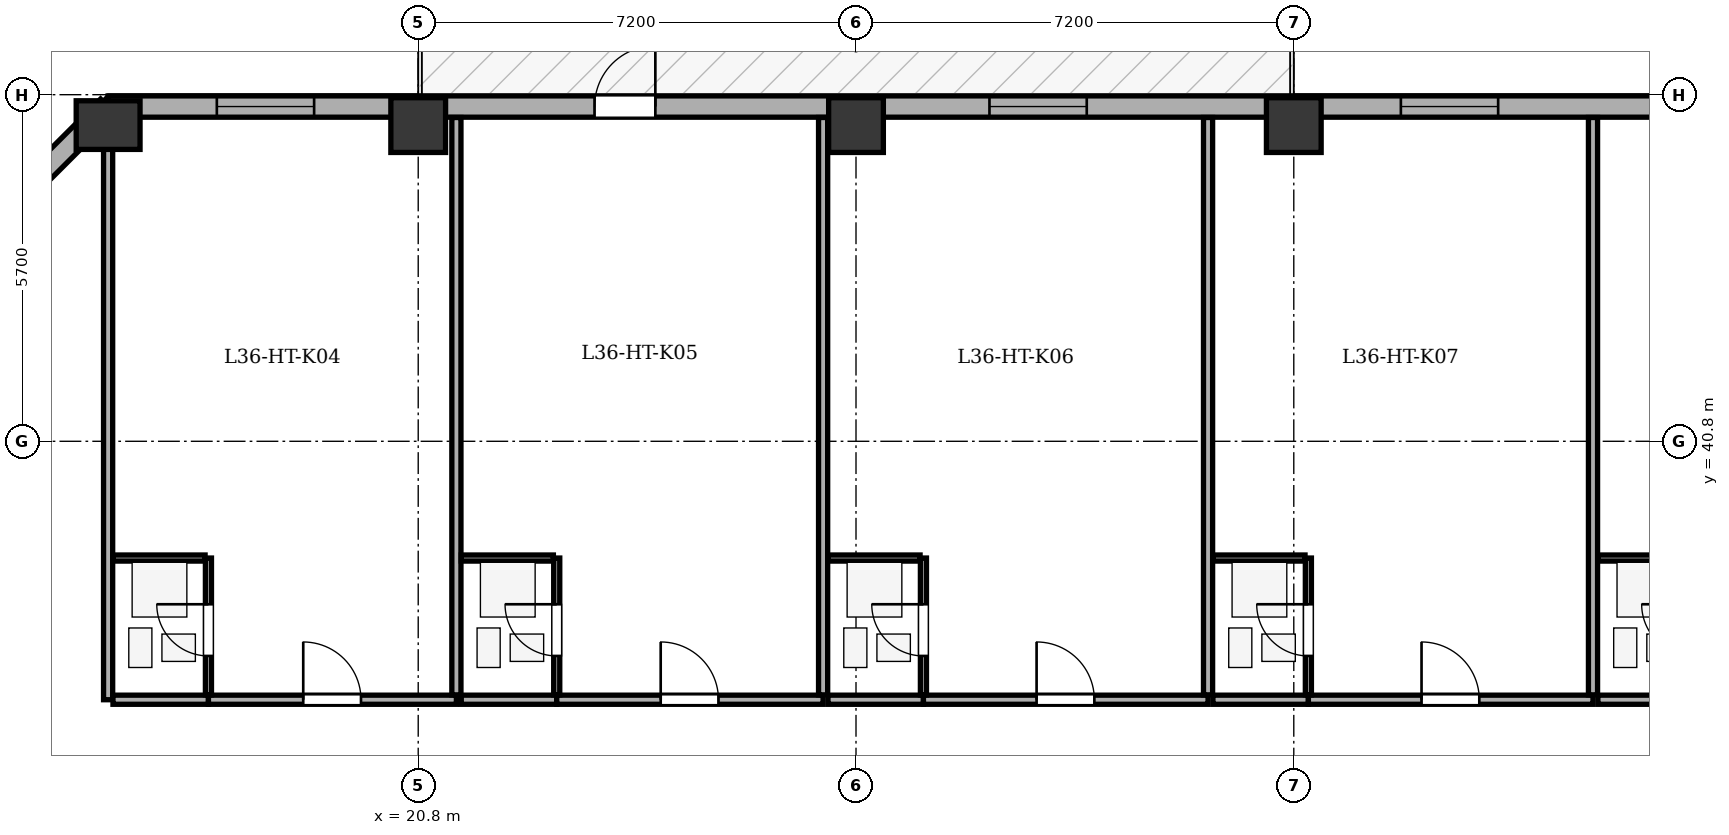
"""IFC4 building model, lengths in metres.
Left out: names, types, materials, properties, quantities, classifications, styles, units other than length and angle.
Written with IfcOpenShell. Run it as: python <this file> out.ifc"""

import sys

from ifc_helpers import new_model, si_unit, direction, frame, frame_2d, origin, origin_2d, place, context, subcontext, project, spatial, rectangle, extrude, element, fill, save


model = new_model("IFC4")
c1 = context("Model", 3, precision=1e-05, world=origin(), true_north=direction((0.0, 1.0)))
c2 = subcontext(c1, "Body", "Model", "MODEL_VIEW")
j1 = project(units=[si_unit("LENGTHUNIT", "METRE"), si_unit("PLANEANGLEUNIT", "RADIAN")], contexts=[c1])
p1 = place(None, origin())
s1 = spatial("IfcSite", under=j1, at=p1, CompositionType="ELEMENT")
p2 = place(p1, origin())
s2 = spatial("IfcBuilding", under=s1, at=p2, CompositionType="ELEMENT")
p3 = place(p2, frame((0.0, 0.0, 144.8)))
s3 = spatial("IfcBuildingStorey", under=s2, at=p3, CompositionType="ELEMENT", Elevation=144.8)
p4 = place(p3, frame((15.7, 46.0, 0.0), z_axis=(0.0, 0.0, 1.0), x_axis=(1.0, 0.0, 0.0)))
e1 = element("IfcColumn", 1, at=p4, inside=s3, PredefinedType="COLUMN", context=c2, shape_type="SweptSolid", body=[
    extrude(rectangle(XDim=0.8, YDim=1.05, at=origin_2d()), origin(), (0.0, 0.0, 1.0), 3.5),
])
for number, where, z_axis, x_axis in (
    (2, (20.8, 46.0, 0.0), (0.0, 0.0, 1.0), (1.0, 0.0, 0.0)),
    (3, (28.0, 46.0, 0.0), (0.0, 0.0, 1.0), (1.0, 0.0, 0.0)),
    (4, (35.2, 46.0, 0.0), (0.0, 0.0, 1.0), (1.0, 0.0, 0.0)),
):
    element("IfcColumn", number, at=place(p3, frame(where, z_axis=z_axis, x_axis=x_axis)), inside=s3, PredefinedType="COLUMN", context=c2, shape_type="SweptSolid", body=[
        extrude(rectangle(XDim=0.9, YDim=0.9, at=origin_2d()), origin(), (0.0, 0.0, 1.0), 3.5),
    ])
p5 = place(p3, frame((10.895, 41.5, 0.0), z_axis=(0.0, 0.0, 1.0), x_axis=(0.707106781187, 0.707106781187, 0.0)))
e5 = element("IfcWall", 5, at=p5, inside=s3, PredefinedType="STANDARD", context=c2, shape_type="SweptSolid", body=[
    extrude(rectangle(XDim=6.795, YDim=0.35, at=frame_2d((3.397, 0.0))), origin(), (0.0, 0.0, 1.0), 2.785),
])
p6 = place(p5, frame((2.698, 0.0, 0.75)))
e6 = element("IfcOpeningElement", 6, at=p6, cuts=e5, PredefinedType="OPENING", context=c2, shape_type="SweptSolid", body=[
    extrude(rectangle(XDim=1.4, YDim=1.65, at=frame_2d((0.7, 0.825))), frame((0.0, 0.185, 0.0), z_axis=(0.0, -1.0, 0.0), x_axis=(1.0, 0.0, 0.0)), (0.0, 0.0, 1.0), 0.37),
])
p7 = place(p3, frame((15.7, 46.305, 0.0), z_axis=(0.0, 0.0, 1.0), x_axis=(1.0, 0.0, 0.0)))
e7 = element("IfcWall", 7, at=p7, inside=s3, PredefinedType="STANDARD", context=c2, shape_type="SweptSolid", body=[
    extrude(rectangle(XDim=35.0, YDim=0.35, at=frame_2d((17.5, 0.0))), origin(), (0.0, 0.0, 1.0), 2.785),
])
p8 = place(p7, frame((8.0, 0.0, 0.0)))
e8 = element("IfcOpeningElement", 8, at=p8, cuts=e7, PredefinedType="OPENING", context=c2, shape_type="SweptSolid", body=[
    extrude(rectangle(XDim=1.0, YDim=2.02, at=frame_2d((0.5, 1.01))), frame((0.0, 0.185, 0.0), z_axis=(0.0, -1.0, 0.0), x_axis=(1.0, 0.0, 0.0)), (0.0, 0.0, 1.0), 0.37),
])
p9 = place(p7, frame((1.788, 0.0, 0.75)))
e9 = element("IfcOpeningElement", 9, at=p9, cuts=e7, PredefinedType="OPENING", context=c2, shape_type="SweptSolid", body=[
    extrude(rectangle(XDim=1.6, YDim=1.75, at=frame_2d((0.8, 0.875))), frame((0.0, 0.185, 0.0), z_axis=(0.0, -1.0, 0.0), x_axis=(1.0, 0.0, 0.0)), (0.0, 0.0, 1.0), 0.37),
])
p10 = place(p7, frame((14.495, 0.0, 0.75)))
e10 = element("IfcOpeningElement", 10, at=p10, cuts=e7, PredefinedType="OPENING", context=c2, shape_type="SweptSolid", body=[
    extrude(rectangle(XDim=1.6, YDim=1.75, at=frame_2d((0.8, 0.875))), frame((0.0, 0.185, 0.0), z_axis=(0.0, -1.0, 0.0), x_axis=(1.0, 0.0, 0.0)), (0.0, 0.0, 1.0), 0.37),
])
p11 = place(p7, frame((21.261, 0.0, 0.75)))
e11 = element("IfcOpeningElement", 11, at=p11, cuts=e7, PredefinedType="OPENING", context=c2, shape_type="SweptSolid", body=[
    extrude(rectangle(XDim=1.6, YDim=1.75, at=frame_2d((0.8, 0.875))), frame((0.0, 0.185, 0.0), z_axis=(0.0, -1.0, 0.0), x_axis=(1.0, 0.0, 0.0)), (0.0, 0.0, 1.0), 0.37),
])
p12 = place(p7, frame((26.486, 0.0, 0.75)))
e12 = element("IfcOpeningElement", 12, at=p12, cuts=e7, PredefinedType="OPENING", context=c2, shape_type="SweptSolid", body=[
    extrude(rectangle(XDim=1.6, YDim=1.75, at=frame_2d((0.8, 0.875))), frame((0.0, 0.185, 0.0), z_axis=(0.0, -1.0, 0.0), x_axis=(1.0, 0.0, 0.0)), (0.0, 0.0, 1.0), 0.37),
])
p13 = place(p7, frame((31.637, 0.0, 0.75)))
e13 = element("IfcOpeningElement", 13, at=p13, cuts=e7, PredefinedType="OPENING", context=c2, shape_type="SweptSolid", body=[
    extrude(rectangle(XDim=1.6, YDim=1.75, at=frame_2d((0.8, 0.875))), frame((0.0, 0.185, 0.0), z_axis=(0.0, -1.0, 0.0), x_axis=(1.0, 0.0, 0.0)), (0.0, 0.0, 1.0), 0.37),
])
p14 = place(p3, frame((15.7, 36.55, 0.0), z_axis=(0.0, 0.0, 1.0), x_axis=(0.0, 1.0, 0.0)))
e14 = element("IfcWall", 14, at=p14, inside=s3, PredefinedType="PARTITIONING", context=c2, shape_type="SweptSolid", body=[
    extrude(rectangle(XDim=9.575, YDim=0.15, at=frame_2d((4.788, 0.0))), origin(), (0.0, 0.0, 1.0), 3.2),
])
p15 = place(p3, frame((15.78, 36.55, 0.0), z_axis=(0.0, 0.0, 1.0), x_axis=(1.0, 0.0, 0.0)))
e15 = element("IfcWall", 15, at=p15, inside=s3, PredefinedType="PARTITIONING", context=c2, shape_type="SweptSolid", body=[
    extrude(rectangle(XDim=1.57, YDim=0.15, at=frame_2d((0.785, 0.0))), origin(), (0.0, 0.0, 1.0), 3.2),
])
p16 = place(p3, frame((17.35, 36.55, 0.0), z_axis=(0.0, 0.0, 1.0), x_axis=(1.0, 0.0, 0.0)))
e16 = element("IfcWall", 16, at=p16, inside=s3, PredefinedType="PARTITIONING", context=c2, shape_type="SweptSolid", body=[
    extrude(rectangle(XDim=4.078, YDim=0.15, at=frame_2d((2.039, 0.0))), origin(), (0.0, 0.0, 1.0), 3.2),
])
p17 = place(p16, frame((1.559, 0.0, 0.0)))
e17 = element("IfcOpeningElement", 17, at=p17, cuts=e16, PredefinedType="OPENING", context=c2, shape_type="SweptSolid", body=[
    extrude(rectangle(XDim=0.95, YDim=2.1, at=frame_2d((0.475, 1.05))), frame((0.0, 0.085, 0.0), z_axis=(0.0, -1.0, 0.0), x_axis=(1.0, 0.0, 0.0)), (0.0, 0.0, 1.0), 0.17),
])
p18 = place(p3, frame((17.35, 36.63, 0.0), z_axis=(0.0, 0.0, 1.0), x_axis=(0.0, 1.0, 0.0)))
e18 = element("IfcWall", 18, at=p18, inside=s3, PredefinedType="PARTITIONING", context=c2, shape_type="SweptSolid", body=[
    extrude(rectangle(XDim=2.25, YDim=0.1, at=frame_2d((1.125, 0.0))), origin(), (0.0, 0.0, 1.0), 3.2),
])
p19 = place(p18, frame((0.64, 0.0, 0.0)))
e19 = element("IfcOpeningElement", 19, at=p19, cuts=e18, PredefinedType="OPENING", context=c2, shape_type="SweptSolid", body=[
    extrude(rectangle(XDim=0.85, YDim=2.05, at=frame_2d((0.425, 1.025))), frame((0.0, 0.06, 0.0), z_axis=(0.0, -1.0, 0.0), x_axis=(1.0, 0.0, 0.0)), (0.0, 0.0, 1.0), 0.12),
])
p20 = place(p3, frame((15.78, 38.88, 0.0), z_axis=(0.0, 0.0, 1.0), x_axis=(1.0, 0.0, 0.0)))
e20 = element("IfcWall", 20, at=p20, inside=s3, PredefinedType="PARTITIONING", context=c2, shape_type="SweptSolid", body=[
    extrude(rectangle(XDim=1.515, YDim=0.1, at=frame_2d((0.757, 0.0))), origin(), (0.0, 0.0, 1.0), 3.2),
])
p21 = place(p3, frame((21.428, 36.63, 0.0), z_axis=(0.0, 0.0, 1.0), x_axis=(0.0, 1.0, 0.0)))
e21 = element("IfcWall", 21, at=p21, inside=s3, PredefinedType="PARTITIONING", context=c2, shape_type="SweptSolid", body=[
    extrude(rectangle(XDim=9.495, YDim=0.15, at=frame_2d((4.748, 0.0))), origin(), (0.0, 0.0, 1.0), 3.2),
])
p22 = place(p3, frame((21.508, 36.55, 0.0), z_axis=(0.0, 0.0, 1.0), x_axis=(1.0, 0.0, 0.0)))
e22 = element("IfcWall", 22, at=p22, inside=s3, PredefinedType="PARTITIONING", context=c2, shape_type="SweptSolid", body=[
    extrude(rectangle(XDim=1.57, YDim=0.15, at=frame_2d((0.785, 0.0))), origin(), (0.0, 0.0, 1.0), 3.2),
])
p23 = place(p3, frame((23.078, 36.55, 0.0), z_axis=(0.0, 0.0, 1.0), x_axis=(1.0, 0.0, 0.0)))
e23 = element("IfcWall", 23, at=p23, inside=s3, PredefinedType="PARTITIONING", context=c2, shape_type="SweptSolid", body=[
    extrude(rectangle(XDim=4.381, YDim=0.15, at=frame_2d((2.19, 0.0))), origin(), (0.0, 0.0, 1.0), 3.2),
])
p24 = place(p23, frame((1.71, 0.0, 0.0)))
e24 = element("IfcOpeningElement", 24, at=p24, cuts=e23, PredefinedType="OPENING", context=c2, shape_type="SweptSolid", body=[
    extrude(rectangle(XDim=0.95, YDim=2.1, at=frame_2d((0.475, 1.05))), frame((0.0, 0.085, 0.0), z_axis=(0.0, -1.0, 0.0), x_axis=(1.0, 0.0, 0.0)), (0.0, 0.0, 1.0), 0.17),
])
p25 = place(p3, frame((23.078, 36.63, 0.0), z_axis=(0.0, 0.0, 1.0), x_axis=(0.0, 1.0, 0.0)))
e25 = element("IfcWall", 25, at=p25, inside=s3, PredefinedType="PARTITIONING", context=c2, shape_type="SweptSolid", body=[
    extrude(rectangle(XDim=2.25, YDim=0.1, at=frame_2d((1.125, 0.0))), origin(), (0.0, 0.0, 1.0), 3.2),
])
p26 = place(p25, frame((0.64, 0.0, 0.0)))
e26 = element("IfcOpeningElement", 26, at=p26, cuts=e25, PredefinedType="OPENING", context=c2, shape_type="SweptSolid", body=[
    extrude(rectangle(XDim=0.85, YDim=2.05, at=frame_2d((0.425, 1.025))), frame((0.0, 0.06, 0.0), z_axis=(0.0, -1.0, 0.0), x_axis=(1.0, 0.0, 0.0)), (0.0, 0.0, 1.0), 0.12),
])
p27 = place(p3, frame((21.508, 38.88, 0.0), z_axis=(0.0, 0.0, 1.0), x_axis=(1.0, 0.0, 0.0)))
e27 = element("IfcWall", 27, at=p27, inside=s3, PredefinedType="PARTITIONING", context=c2, shape_type="SweptSolid", body=[
    extrude(rectangle(XDim=1.515, YDim=0.1, at=frame_2d((0.757, 0.0))), origin(), (0.0, 0.0, 1.0), 3.2),
])
p28 = place(p3, frame((27.459, 36.63, 0.0), z_axis=(0.0, 0.0, 1.0), x_axis=(0.0, 1.0, 0.0)))
e28 = element("IfcWall", 28, at=p28, inside=s3, PredefinedType="PARTITIONING", context=c2, shape_type="SweptSolid", body=[
    extrude(rectangle(XDim=9.495, YDim=0.15, at=frame_2d((4.748, 0.0))), origin(), (0.0, 0.0, 1.0), 3.2),
])
p29 = place(p3, frame((27.539, 36.55, 0.0), z_axis=(0.0, 0.0, 1.0), x_axis=(1.0, 0.0, 0.0)))
e29 = element("IfcWall", 29, at=p29, inside=s3, PredefinedType="PARTITIONING", context=c2, shape_type="SweptSolid", body=[
    extrude(rectangle(XDim=1.57, YDim=0.15, at=frame_2d((0.785, 0.0))), origin(), (0.0, 0.0, 1.0), 3.2),
])
p30 = place(p3, frame((29.109, 36.55, 0.0), z_axis=(0.0, 0.0, 1.0), x_axis=(1.0, 0.0, 0.0)))
e30 = element("IfcWall", 30, at=p30, inside=s3, PredefinedType="PARTITIONING", context=c2, shape_type="SweptSolid", body=[
    extrude(rectangle(XDim=4.681, YDim=0.15, at=frame_2d((2.341, 0.0))), origin(), (0.0, 0.0, 1.0), 3.2),
])
p31 = place(p30, frame((1.861, 0.0, 0.0)))
e31 = element("IfcOpeningElement", 31, at=p31, cuts=e30, PredefinedType="OPENING", context=c2, shape_type="SweptSolid", body=[
    extrude(rectangle(XDim=0.95, YDim=2.1, at=frame_2d((0.475, 1.05))), frame((0.0, 0.085, 0.0), z_axis=(0.0, -1.0, 0.0), x_axis=(1.0, 0.0, 0.0)), (0.0, 0.0, 1.0), 0.17),
])
p32 = place(p3, frame((29.109, 36.63, 0.0), z_axis=(0.0, 0.0, 1.0), x_axis=(0.0, 1.0, 0.0)))
e32 = element("IfcWall", 32, at=p32, inside=s3, PredefinedType="PARTITIONING", context=c2, shape_type="SweptSolid", body=[
    extrude(rectangle(XDim=2.25, YDim=0.1, at=frame_2d((1.125, 0.0))), origin(), (0.0, 0.0, 1.0), 3.2),
])
p33 = place(p32, frame((0.64, 0.0, 0.0)))
e33 = element("IfcOpeningElement", 33, at=p33, cuts=e32, PredefinedType="OPENING", context=c2, shape_type="SweptSolid", body=[
    extrude(rectangle(XDim=0.85, YDim=2.05, at=frame_2d((0.425, 1.025))), frame((0.0, 0.06, 0.0), z_axis=(0.0, -1.0, 0.0), x_axis=(1.0, 0.0, 0.0)), (0.0, 0.0, 1.0), 0.12),
])
p34 = place(p3, frame((27.539, 38.88, 0.0), z_axis=(0.0, 0.0, 1.0), x_axis=(1.0, 0.0, 0.0)))
e34 = element("IfcWall", 34, at=p34, inside=s3, PredefinedType="PARTITIONING", context=c2, shape_type="SweptSolid", body=[
    extrude(rectangle(XDim=1.515, YDim=0.1, at=frame_2d((0.757, 0.0))), origin(), (0.0, 0.0, 1.0), 3.2),
])
p35 = place(p3, frame((33.79, 36.63, 0.0), z_axis=(0.0, 0.0, 1.0), x_axis=(0.0, 1.0, 0.0)))
e35 = element("IfcWall", 35, at=p35, inside=s3, PredefinedType="PARTITIONING", context=c2, shape_type="SweptSolid", body=[
    extrude(rectangle(XDim=9.495, YDim=0.15, at=frame_2d((4.748, 0.0))), origin(), (0.0, 0.0, 1.0), 2.785),
])
p36 = place(p3, frame((33.87, 36.55, 0.0), z_axis=(0.0, 0.0, 1.0), x_axis=(1.0, 0.0, 0.0)))
e36 = element("IfcWall", 36, at=p36, inside=s3, PredefinedType="PARTITIONING", context=c2, shape_type="SweptSolid", body=[
    extrude(rectangle(XDim=1.57, YDim=0.15, at=frame_2d((0.785, 0.0))), origin(), (0.0, 0.0, 1.0), 3.2),
])
p37 = place(p3, frame((35.44, 36.55, 0.0), z_axis=(0.0, 0.0, 1.0), x_axis=(1.0, 0.0, 0.0)))
e37 = element("IfcWall", 37, at=p37, inside=s3, PredefinedType="PARTITIONING", context=c2, shape_type="SweptSolid", body=[
    extrude(rectangle(XDim=4.681, YDim=0.15, at=frame_2d((2.341, 0.0))), origin(), (0.0, 0.0, 1.0), 3.2),
])
p38 = place(p37, frame((1.861, 0.0, 0.0)))
e38 = element("IfcOpeningElement", 38, at=p38, cuts=e37, PredefinedType="OPENING", context=c2, shape_type="SweptSolid", body=[
    extrude(rectangle(XDim=0.95, YDim=2.1, at=frame_2d((0.475, 1.05))), frame((0.0, 0.085, 0.0), z_axis=(0.0, -1.0, 0.0), x_axis=(1.0, 0.0, 0.0)), (0.0, 0.0, 1.0), 0.17),
])
p39 = place(p3, frame((35.44, 36.63, 0.0), z_axis=(0.0, 0.0, 1.0), x_axis=(0.0, 1.0, 0.0)))
e39 = element("IfcWall", 39, at=p39, inside=s3, PredefinedType="PARTITIONING", context=c2, shape_type="SweptSolid", body=[
    extrude(rectangle(XDim=2.25, YDim=0.1, at=frame_2d((1.125, 0.0))), origin(), (0.0, 0.0, 1.0), 2.535),
])
p40 = place(p39, frame((0.64, 0.0, 0.0)))
e40 = element("IfcOpeningElement", 40, at=p40, cuts=e39, PredefinedType="OPENING", context=c2, shape_type="SweptSolid", body=[
    extrude(rectangle(XDim=0.85, YDim=2.05, at=frame_2d((0.425, 1.025))), frame((0.0, 0.06, 0.0), z_axis=(0.0, -1.0, 0.0), x_axis=(1.0, 0.0, 0.0)), (0.0, 0.0, 1.0), 0.12),
])
p41 = place(p3, frame((33.87, 38.88, 0.0), z_axis=(0.0, 0.0, 1.0), x_axis=(1.0, 0.0, 0.0)))
e41 = element("IfcWall", 41, at=p41, inside=s3, PredefinedType="PARTITIONING", context=c2, shape_type="SweptSolid", body=[
    extrude(rectangle(XDim=1.515, YDim=0.1, at=frame_2d((0.757, 0.0))), origin(), (0.0, 0.0, 1.0), 3.2),
])
p42 = place(p3, frame((40.121, 36.63, 0.0), z_axis=(0.0, 0.0, 1.0), x_axis=(0.0, 1.0, 0.0)))
e42 = element("IfcWall", 42, at=p42, inside=s3, PredefinedType="PARTITIONING", context=c2, shape_type="SweptSolid", body=[
    extrude(rectangle(XDim=9.495, YDim=0.15, at=frame_2d((4.748, 0.0))), origin(), (0.0, 0.0, 1.0), 3.2),
])
p43 = place(p3, frame((40.201, 36.55, 0.0), z_axis=(0.0, 0.0, 1.0), x_axis=(1.0, 0.0, 0.0)))
e43 = element("IfcWall", 43, at=p43, inside=s3, PredefinedType="PARTITIONING", context=c2, shape_type="SweptSolid", body=[
    extrude(rectangle(XDim=1.57, YDim=0.15, at=frame_2d((0.785, 0.0))), origin(), (0.0, 0.0, 1.0), 3.2),
])
p44 = place(p3, frame((40.201, 38.88, 0.0), z_axis=(0.0, 0.0, 1.0), x_axis=(1.0, 0.0, 0.0)))
e44 = element("IfcWall", 44, at=p44, inside=s3, PredefinedType="PARTITIONING", context=c2, shape_type="SweptSolid", body=[
    extrude(rectangle(XDim=1.515, YDim=0.1, at=frame_2d((0.758, 0.0))), origin(), (0.0, 0.0, 1.0), 3.2),
])
p45 = place(p8, origin())
e45 = element("IfcDoor", 45, at=p45, inside=s3, OperationType="SINGLE_SWING_RIGHT", PredefinedType="DOOR", context=c2, shape_type="SweptSolid", body=[
    extrude(rectangle(XDim=1.0, YDim=2.02, at=frame_2d((0.5, 1.01))), frame((0.0, 0.025, 0.0), z_axis=(0.0, -1.0, 0.0), x_axis=(1.0, 0.0, 0.0)), (0.0, 0.0, 1.0), 0.05),
])
fill(e8, e45)
p46 = place(p9, origin())
e46 = element("IfcWindow", 46, at=p46, inside=s3, PartitioningType="SINGLE_PANEL", PredefinedType="WINDOW", context=c2, shape_type="SweptSolid", body=[
    extrude(rectangle(XDim=1.6, YDim=1.75, at=frame_2d((0.8, 0.875))), frame((0.0, -0.01, 0.0), z_axis=(0.0, -1.0, 0.0), x_axis=(1.0, 0.0, 0.0)), (0.0, 0.0, 1.0), 0.06),
])
fill(e9, e46)
p47 = place(p10, origin())
e47 = element("IfcWindow", 47, at=p47, inside=s3, PartitioningType="SINGLE_PANEL", PredefinedType="WINDOW", context=c2, shape_type="SweptSolid", body=[
    extrude(rectangle(XDim=1.6, YDim=1.75, at=frame_2d((0.8, 0.875))), frame((0.0, -0.01, 0.0), z_axis=(0.0, -1.0, 0.0), x_axis=(1.0, 0.0, 0.0)), (0.0, 0.0, 1.0), 0.06),
])
fill(e10, e47)
p48 = place(p11, origin())
e48 = element("IfcWindow", 48, at=p48, inside=s3, PartitioningType="SINGLE_PANEL", PredefinedType="WINDOW", context=c2, shape_type="SweptSolid", body=[
    extrude(rectangle(XDim=1.6, YDim=1.75, at=frame_2d((0.8, 0.875))), frame((0.0, -0.01, 0.0), z_axis=(0.0, -1.0, 0.0), x_axis=(1.0, 0.0, 0.0)), (0.0, 0.0, 1.0), 0.06),
])
fill(e11, e48)
p49 = place(p19, origin())
e49 = element("IfcDoor", 49, at=p49, inside=s3, OperationType="SINGLE_SWING_RIGHT", PredefinedType="DOOR", context=c2, shape_type="SweptSolid", body=[
    extrude(rectangle(XDim=0.85, YDim=2.05, at=frame_2d((0.425, 1.025))), frame((0.0, 0.025, 0.0), z_axis=(0.0, -1.0, 0.0), x_axis=(1.0, 0.0, 0.0)), (0.0, 0.0, 1.0), 0.05),
])
fill(e19, e49)
p50 = place(p17, origin())
e50 = element("IfcDoor", 50, at=p50, inside=s3, OperationType="SINGLE_SWING_LEFT", PredefinedType="DOOR", context=c2, shape_type="SweptSolid", body=[
    extrude(rectangle(XDim=0.95, YDim=2.1, at=frame_2d((0.475, 1.05))), frame((0.0, 0.025, 0.0), z_axis=(0.0, -1.0, 0.0), x_axis=(1.0, 0.0, 0.0)), (0.0, 0.0, 1.0), 0.05),
])
fill(e17, e50)
p51 = place(p26, origin())
e51 = element("IfcDoor", 51, at=p51, inside=s3, OperationType="SINGLE_SWING_RIGHT", PredefinedType="DOOR", context=c2, shape_type="SweptSolid", body=[
    extrude(rectangle(XDim=0.85, YDim=2.05, at=frame_2d((0.425, 1.025))), frame((0.0, 0.025, 0.0), z_axis=(0.0, -1.0, 0.0), x_axis=(1.0, 0.0, 0.0)), (0.0, 0.0, 1.0), 0.05),
])
fill(e26, e51)
p52 = place(p24, origin())
e52 = element("IfcDoor", 52, at=p52, inside=s3, OperationType="SINGLE_SWING_LEFT", PredefinedType="DOOR", context=c2, shape_type="SweptSolid", body=[
    extrude(rectangle(XDim=0.95, YDim=2.1, at=frame_2d((0.475, 1.05))), frame((0.0, 0.025, 0.0), z_axis=(0.0, -1.0, 0.0), x_axis=(1.0, 0.0, 0.0)), (0.0, 0.0, 1.0), 0.05),
])
fill(e24, e52)
p53 = place(p33, origin())
e53 = element("IfcDoor", 53, at=p53, inside=s3, OperationType="SINGLE_SWING_RIGHT", PredefinedType="DOOR", context=c2, shape_type="SweptSolid", body=[
    extrude(rectangle(XDim=0.85, YDim=2.05, at=frame_2d((0.425, 1.025))), frame((0.0, 0.025, 0.0), z_axis=(0.0, -1.0, 0.0), x_axis=(1.0, 0.0, 0.0)), (0.0, 0.0, 1.0), 0.05),
])
fill(e33, e53)
p54 = place(p31, origin())
e54 = element("IfcDoor", 54, at=p54, inside=s3, OperationType="SINGLE_SWING_LEFT", PredefinedType="DOOR", context=c2, shape_type="SweptSolid", body=[
    extrude(rectangle(XDim=0.95, YDim=2.1, at=frame_2d((0.475, 1.05))), frame((0.0, 0.025, 0.0), z_axis=(0.0, -1.0, 0.0), x_axis=(1.0, 0.0, 0.0)), (0.0, 0.0, 1.0), 0.05),
])
fill(e31, e54)
p55 = place(p40, origin())
e55 = element("IfcDoor", 55, at=p55, inside=s3, OperationType="SINGLE_SWING_RIGHT", PredefinedType="DOOR", context=c2, shape_type="SweptSolid", body=[
    extrude(rectangle(XDim=0.85, YDim=2.05, at=frame_2d((0.425, 1.025))), frame((0.0, 0.025, 0.0), z_axis=(0.0, -1.0, 0.0), x_axis=(1.0, 0.0, 0.0)), (0.0, 0.0, 1.0), 0.05),
])
fill(e40, e55)
p56 = place(p38, origin())
e56 = element("IfcDoor", 56, at=p56, inside=s3, OperationType="SINGLE_SWING_LEFT", PredefinedType="DOOR", context=c2, shape_type="SweptSolid", body=[
    extrude(rectangle(XDim=0.95, YDim=2.1, at=frame_2d((0.475, 1.05))), frame((0.0, 0.025, 0.0), z_axis=(0.0, -1.0, 0.0), x_axis=(1.0, 0.0, 0.0)), (0.0, 0.0, 1.0), 0.05),
])
fill(e38, e56)
save(model, sys.argv[1])
